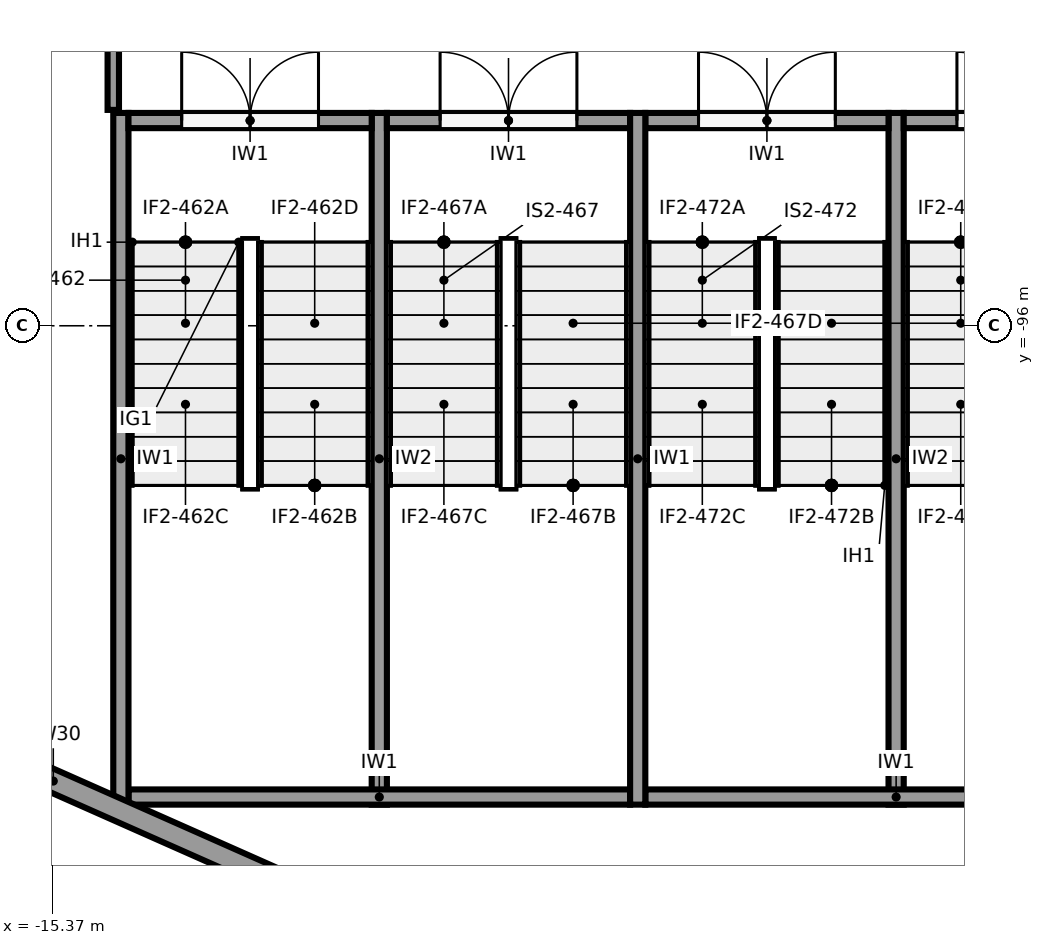
"""IFC4 building model, lengths in metres.
Left out: names, types, materials, properties, quantities, classifications, styles, units other than length and angle.
Written with IfcOpenShell. Run it as: python <this file> out.ifc"""

import sys

from ifc_helpers import new_model, si_unit, direction, frame, frame_2d, origin, place, context, subcontext, project, spatial, rectangle, extrude, element, fill, save


model = new_model("IFC4")
c1 = context("Model", 3, precision=1e-05, world=origin(), true_north=direction((0.0, 1.0)))
c2 = subcontext(c1, "Body", "Model", "MODEL_VIEW")
j1 = project(units=[si_unit("LENGTHUNIT", "METRE"), si_unit("PLANEANGLEUNIT", "RADIAN")], contexts=[c1])
p1 = place(None, origin())
s1 = spatial("IfcSite", under=j1, at=p1, CompositionType="ELEMENT")
p2 = place(p1, origin())
s2 = spatial("IfcBuilding", under=s1, at=p2, CompositionType="ELEMENT")
p3 = place(p2, origin())
s3 = spatial("IfcBuildingStorey", under=s2, at=p3, CompositionType="ELEMENT", Elevation=0.0)
p4 = place(p3, frame((-8.123, -105.198, 0.0), z_axis=(0.0, 0.0, 1.0), x_axis=(-0.914138897099, 0.405401130748, 0.0)))
e1 = element("IfcWall", 1, at=p4, inside=s3, PredefinedType="SOLIDWALL", context=c2, shape_type="SweptSolid", body=[
    extrude(rectangle(XDim=15.824, YDim=0.3, at=frame_2d((7.912, 0.0))), origin(), (0.0, 0.0, 1.0), 4.85),
])
p5 = place(p4, frame((11.574, 0.0, 0.0)))
e2 = element("IfcOpeningElement", 2, at=p5, cuts=e1, PredefinedType="OPENING", context=c2, shape_type="SweptSolid", body=[
    extrude(rectangle(XDim=1.8, YDim=2.4, at=frame_2d((0.9, 1.2))), frame((0.0, 0.16, 0.0), z_axis=(0.0, -1.0, 0.0), x_axis=(1.0, 0.0, 0.0)), (0.0, 0.0, 1.0), 0.32),
])
p6 = place(p3, frame((7.256, -98.782, 0.0), z_axis=(0.0, 0.0, 1.0), x_axis=(-0.914136361455, -0.405406848322, 0.0)))
e3 = element("IfcWall", 3, at=p6, inside=s3, PredefinedType="SOLIDWALL", context=c2, shape_type="SweptSolid", body=[
    extrude(rectangle(XDim=15.824, YDim=0.35, at=frame_2d((7.912, 0.0))), origin(), (0.0, 0.0, 1.0), 4.85),
])
for number, where, z_axis, x_axis in (
    (4, (-14.467, -102.3, 0.0), (0.0, 0.0, 1.0), (0.0, 1.0, 0.0)),
    (5, (-7.667, -102.3, 0.0), (0.0, 0.0, 1.0), (0.0, 1.0, 0.0)),
):
    element("IfcWall", number, at=place(p3, frame(where, z_axis=z_axis, x_axis=x_axis)), inside=s3, PredefinedType="SHEAR", context=c2, shape_type="SweptSolid", body=[
        extrude(rectangle(XDim=9.1, YDim=0.2, at=frame_2d((4.55, 0.0))), origin(), (0.0, 0.0, 1.0), 6.15),
    ])
p7 = place(p3, frame((-14.367, -102.2, 0.0), z_axis=(0.0, 0.0, 1.0), x_axis=(1.0, 0.0, 0.0)))
e6 = element("IfcWall", 6, at=p7, inside=s3, PredefinedType="SHEAR", context=c2, shape_type="SweptSolid", body=[
    extrude(rectangle(XDim=6.6, YDim=0.2, at=frame_2d((3.3, 0.0))), origin(), (0.0, 0.0, 1.0), 6.15),
])
p8 = place(p3, frame((-7.567, -102.2, 0.0), z_axis=(0.0, 0.0, 1.0), x_axis=(1.0, 0.0, 0.0)))
e7 = element("IfcWall", 7, at=p8, inside=s3, PredefinedType="SHEAR", context=c2, shape_type="SweptSolid", body=[
    extrude(rectangle(XDim=6.6, YDim=0.2, at=frame_2d((3.3, 0.0))), origin(), (0.0, 0.0, 1.0), 6.15),
])
for number, where, z_axis, x_axis in (
    (8, (-11.067, -102.3, 0.0), (0.0, 0.0, 1.0), (0.0, 1.0, 0.0)),
    (9, (-4.267, -102.3, 0.0), (0.0, 0.0, 1.0), (0.0, 1.0, 0.0)),
):
    element("IfcWall", number, at=place(p3, frame(where, z_axis=z_axis, x_axis=x_axis)), inside=s3, PredefinedType="SHEAR", context=c2, shape_type="SweptSolid", body=[
        extrude(rectangle(XDim=9.1, YDim=0.2, at=frame_2d((4.55, 0.0))), origin(), (0.0, 0.0, 1.0), 6.15),
    ])
p9 = place(p3, frame((-14.367, -93.3, 0.0), z_axis=(0.0, 0.0, 1.0), x_axis=(1.0, 0.0, 0.0)))
e10 = element("IfcWall", 10, at=p9, inside=s3, PredefinedType="SHEAR", context=c2, shape_type="SweptSolid", body=[
    extrude(rectangle(XDim=3.2, YDim=0.2, at=frame_2d((1.6, 0.0))), origin(), (0.0, 0.0, 1.0), 6.15),
])
p10 = place(p9, frame((0.7, 0.0, 0.0)))
e11 = element("IfcOpeningElement", 11, at=p10, cuts=e10, PredefinedType="OPENING", context=c2, shape_type="SweptSolid", body=[
    extrude(rectangle(XDim=1.8, YDim=2.1, at=frame_2d((0.9, 1.05))), frame((0.0, 0.11, 0.0), z_axis=(0.0, -1.0, 0.0), x_axis=(1.0, 0.0, 0.0)), (0.0, 0.0, 1.0), 0.22),
])
p11 = place(p3, frame((-10.967, -93.3, 0.0), z_axis=(0.0, 0.0, 1.0), x_axis=(1.0, 0.0, 0.0)))
e12 = element("IfcWall", 12, at=p11, inside=s3, PredefinedType="SHEAR", context=c2, shape_type="SweptSolid", body=[
    extrude(rectangle(XDim=3.2, YDim=0.2, at=frame_2d((1.6, 0.0))), origin(), (0.0, 0.0, 1.0), 6.15),
])
p12 = place(p11, frame((0.7, 0.0, 0.0)))
e13 = element("IfcOpeningElement", 13, at=p12, cuts=e12, PredefinedType="OPENING", context=c2, shape_type="SweptSolid", body=[
    extrude(rectangle(XDim=1.8, YDim=2.1, at=frame_2d((0.9, 1.05))), frame((0.0, 0.11, 0.0), z_axis=(0.0, -1.0, 0.0), x_axis=(1.0, 0.0, 0.0)), (0.0, 0.0, 1.0), 0.22),
])
p13 = place(p3, frame((-7.567, -93.3, 0.0), z_axis=(0.0, 0.0, 1.0), x_axis=(1.0, 0.0, 0.0)))
e14 = element("IfcWall", 14, at=p13, inside=s3, PredefinedType="SHEAR", context=c2, shape_type="SweptSolid", body=[
    extrude(rectangle(XDim=3.2, YDim=0.2, at=frame_2d((1.6, 0.0))), origin(), (0.0, 0.0, 1.0), 6.15),
])
p14 = place(p13, frame((0.7, 0.0, 0.0)))
e15 = element("IfcOpeningElement", 15, at=p14, cuts=e14, PredefinedType="OPENING", context=c2, shape_type="SweptSolid", body=[
    extrude(rectangle(XDim=1.8, YDim=2.1, at=frame_2d((0.9, 1.05))), frame((0.0, 0.11, 0.0), z_axis=(0.0, -1.0, 0.0), x_axis=(1.0, 0.0, 0.0)), (0.0, 0.0, 1.0), 0.22),
])
p15 = place(p3, frame((-4.167, -93.3, 0.0), z_axis=(0.0, 0.0, 1.0), x_axis=(1.0, 0.0, 0.0)))
e16 = element("IfcWall", 16, at=p15, inside=s3, PredefinedType="SHEAR", context=c2, shape_type="SweptSolid", body=[
    extrude(rectangle(XDim=3.2, YDim=0.2, at=frame_2d((1.6, 0.0))), origin(), (0.0, 0.0, 1.0), 6.15),
])
p16 = place(p15, frame((0.7, 0.0, 0.0)))
e17 = element("IfcOpeningElement", 17, at=p16, cuts=e16, PredefinedType="OPENING", context=c2, shape_type="SweptSolid", body=[
    extrude(rectangle(XDim=1.8, YDim=2.1, at=frame_2d((0.9, 1.05))), frame((0.0, 0.11, 0.0), z_axis=(0.0, -1.0, 0.0), x_axis=(1.0, 0.0, 0.0)), (0.0, 0.0, 1.0), 0.22),
])
p17 = place(p3, frame((-14.567, -90.366, 0.0), z_axis=(0.0, 0.0, 1.0), x_axis=(0.0, -1.0, 0.0)))
e18 = element("IfcWall", 18, at=p17, inside=s3, PredefinedType="PARTITIONING", context=c2, shape_type="SweptSolid", body=[
    extrude(rectangle(XDim=2.793, YDim=0.15, at=frame_2d((1.397, 0.0))), origin(), (0.0, 0.0, 1.0), 6.15),
])
p18 = place(p3, frame((-21.206, -102.896, 0.0), z_axis=(0.0, 0.0, 1.0), x_axis=(0.914139488504, -0.405399797184, 0.0)))
e19 = element("IfcWall", 19, at=p18, inside=s3, PredefinedType="PARTITIONING", context=c2, shape_type="SweptSolid", body=[
    extrude(rectangle(XDim=14.232, YDim=0.15, at=frame_2d((7.116, 0.0))), origin(), (0.0, 0.0, 1.0), 4.85),
])
p19 = place(p10, origin())
e20 = element("IfcDoor", 20, at=p19, inside=s3, OperationType="DOUBLE_DOOR_SINGLE_SWING", PredefinedType="DOOR", context=c2, shape_type="SweptSolid", body=[
    extrude(rectangle(XDim=1.8, YDim=2.1, at=frame_2d((0.9, 1.05))), frame((0.0, 0.025, 0.0), z_axis=(0.0, -1.0, 0.0), x_axis=(1.0, 0.0, 0.0)), (0.0, 0.0, 1.0), 0.05),
])
fill(e11, e20)
p20 = place(p12, origin())
e21 = element("IfcDoor", 21, at=p20, inside=s3, OperationType="DOUBLE_DOOR_SINGLE_SWING", PredefinedType="DOOR", context=c2, shape_type="SweptSolid", body=[
    extrude(rectangle(XDim=1.8, YDim=2.1, at=frame_2d((0.9, 1.05))), frame((0.0, 0.025, 0.0), z_axis=(0.0, -1.0, 0.0), x_axis=(1.0, 0.0, 0.0)), (0.0, 0.0, 1.0), 0.05),
])
fill(e13, e21)
p21 = place(p14, origin())
e22 = element("IfcDoor", 22, at=p21, inside=s3, OperationType="DOUBLE_DOOR_SINGLE_SWING", PredefinedType="DOOR", context=c2, shape_type="SweptSolid", body=[
    extrude(rectangle(XDim=1.8, YDim=2.1, at=frame_2d((0.9, 1.05))), frame((0.0, 0.025, 0.0), z_axis=(0.0, -1.0, 0.0), x_axis=(1.0, 0.0, 0.0)), (0.0, 0.0, 1.0), 0.05),
])
fill(e15, e22)
p22 = place(p16, origin())
e23 = element("IfcDoor", 23, at=p22, inside=s3, OperationType="DOUBLE_DOOR_SINGLE_SWING", PredefinedType="DOOR", context=c2, shape_type="SweptSolid", body=[
    extrude(rectangle(XDim=1.8, YDim=2.1, at=frame_2d((0.9, 1.05))), frame((0.0, 0.025, 0.0), z_axis=(0.0, -1.0, 0.0), x_axis=(1.0, 0.0, 0.0)), (0.0, 0.0, 1.0), 0.05),
])
fill(e17, e23)
save(model, sys.argv[1])
